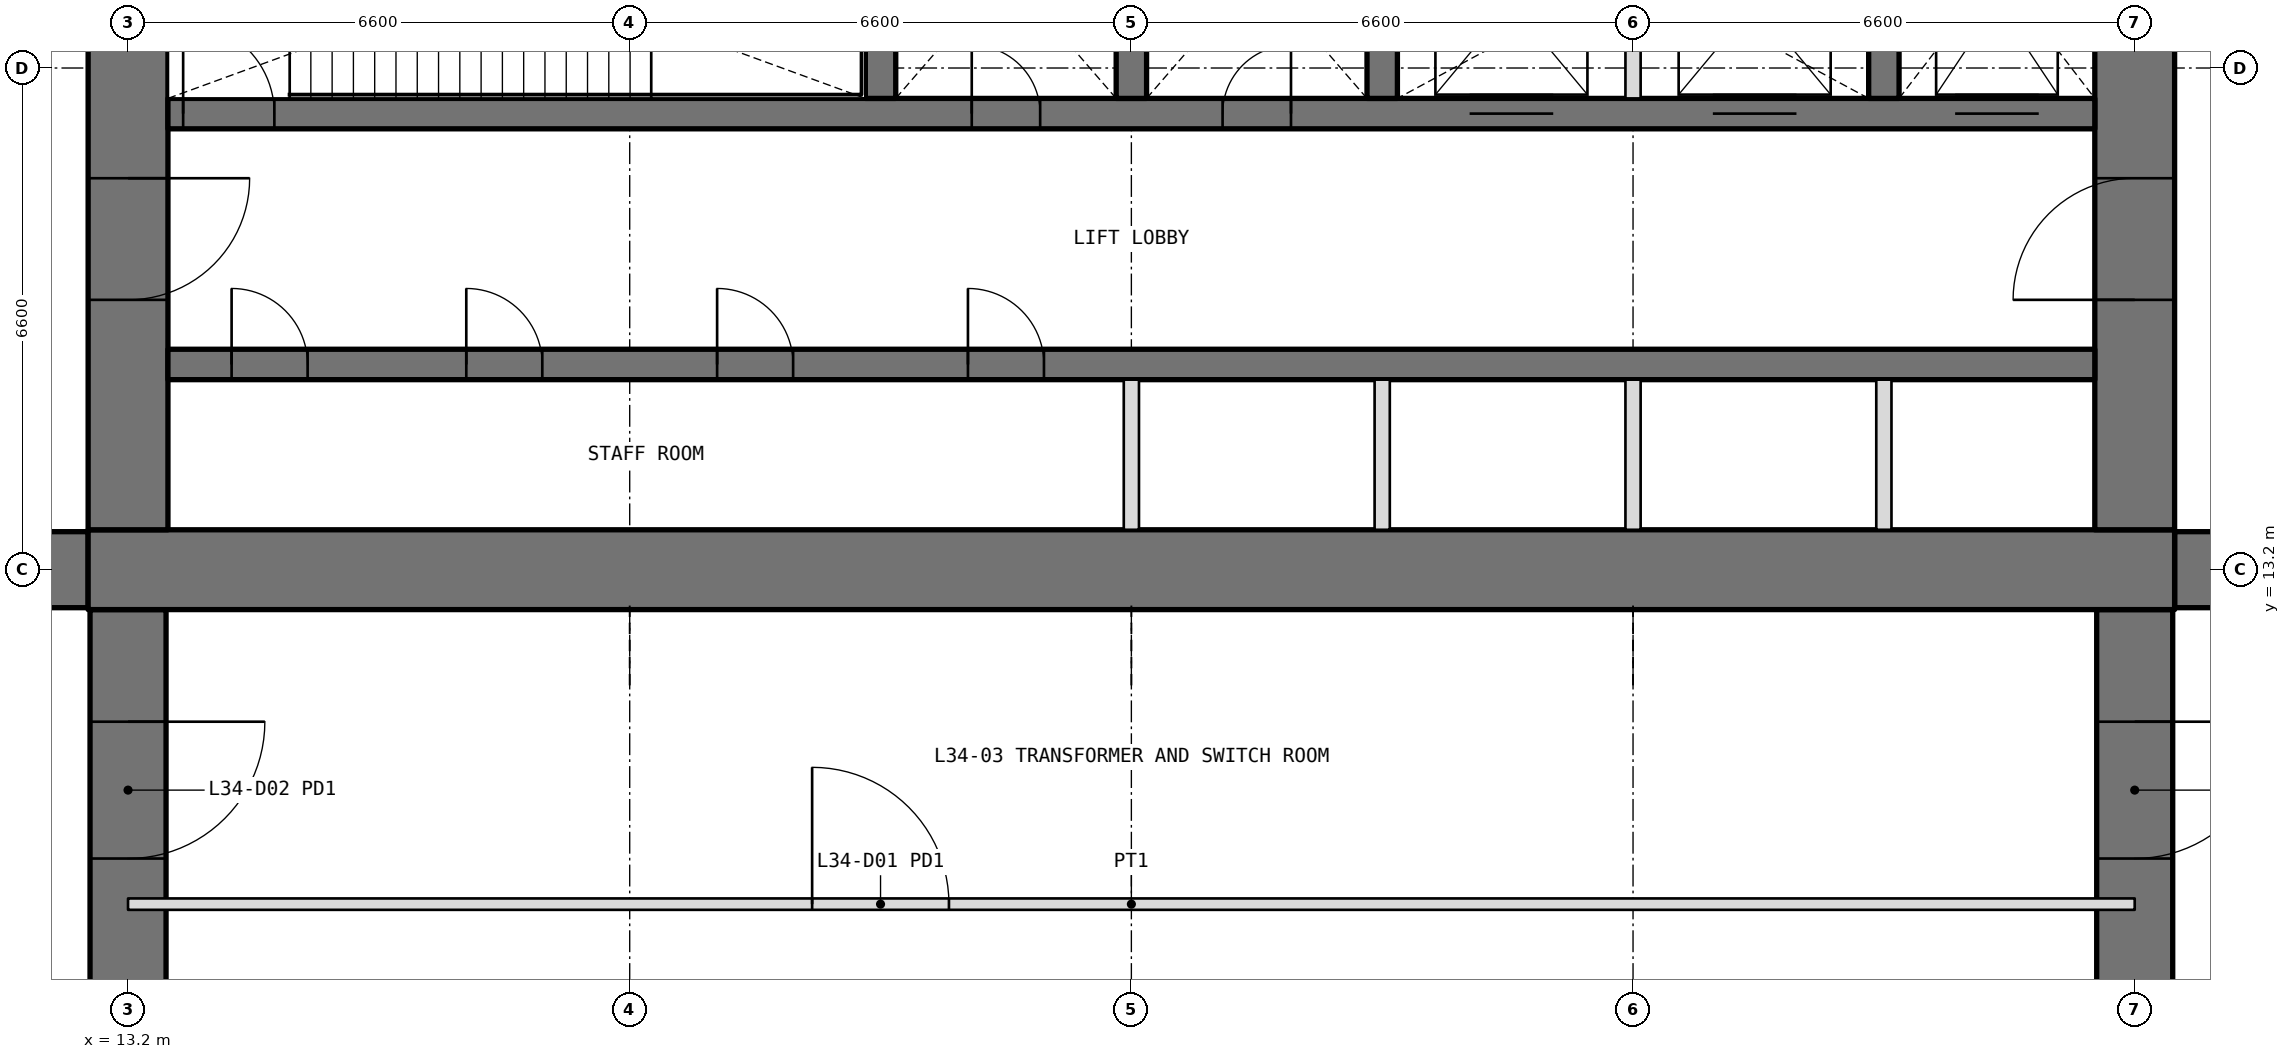
"""IFC4 building model, lengths in metres.
Left out: names, types, materials, properties, quantities, classifications, styles, units other than length and angle.
Written with IfcOpenShell. Run it as: python <this file> out.ifc"""

import sys

from ifc_helpers import new_model, si_unit, direction, frame, frame_2d, origin, place, context, subcontext, project, spatial, rectangle, extrude, element, fill, save


model = new_model("IFC4")
c1 = context("Model", 3, precision=1e-05, world=origin(), true_north=direction((0.0, 1.0)))
c2 = subcontext(c1, "Body", "Model", "MODEL_VIEW")
j1 = project(units=[si_unit("LENGTHUNIT", "METRE"), si_unit("PLANEANGLEUNIT", "RADIAN")], contexts=[c1])
p1 = place(None, origin())
s1 = spatial("IfcSite", under=j1, at=p1, CompositionType="ELEMENT")
p2 = place(p1, origin())
s2 = spatial("IfcBuilding", under=s1, at=p2, CompositionType="ELEMENT")
p3 = place(p2, frame((0.0, 0.0, 149.4)))
s3 = spatial("IfcBuildingStorey", under=s2, at=p3, CompositionType="ELEMENT", Elevation=149.4)
p4 = place(p3, frame((13.2, 12.675, 0.0), z_axis=(0.0, 0.0, 1.0), x_axis=(0.0, -1.0, 0.0)))
e1 = element("IfcWall", 1, at=p4, inside=s3, PredefinedType="SHEAR", context=c2, shape_type="SweptSolid", body=[
    extrude(rectangle(XDim=8.675, YDim=1.0, at=frame_2d((4.337, 0.0))), origin(), (0.0, 0.0, 1.0), 6.0),
])
p5 = place(p4, frame((1.475, 0.0, 0.0)))
e2 = element("IfcOpeningElement", 2, at=p5, cuts=e1, PredefinedType="OPENING", context=c2, shape_type="SweptSolid", body=[
    extrude(rectangle(XDim=1.8, YDim=2.4, at=frame_2d((0.9, 1.2))), frame((0.0, 0.51, 0.0), z_axis=(0.0, -1.0, 0.0), x_axis=(1.0, 0.0, 0.0)), (0.0, 0.0, 1.0), 1.02),
])
p6 = place(p3, frame((39.6, 12.675, 0.0), z_axis=(0.0, 0.0, 1.0), x_axis=(0.0, -1.0, 0.0)))
e3 = element("IfcWall", 3, at=p6, inside=s3, PredefinedType="SHEAR", context=c2, shape_type="SweptSolid", body=[
    extrude(rectangle(XDim=8.675, YDim=1.0, at=frame_2d((4.337, 0.0))), origin(), (0.0, 0.0, 1.0), 6.0),
])
p7 = place(p6, frame((1.475, 0.0, 0.0)))
e4 = element("IfcOpeningElement", 4, at=p7, cuts=e3, PredefinedType="OPENING", context=c2, shape_type="SweptSolid", body=[
    extrude(rectangle(XDim=1.8, YDim=2.4, at=frame_2d((0.9, 1.2))), frame((0.0, 0.51, 0.0), z_axis=(0.0, -1.0, 0.0), x_axis=(1.0, 0.0, 0.0)), (0.0, 0.0, 1.0), 1.02),
])
p8 = place(p3, frame((12.675, 13.2, 0.0), z_axis=(0.0, 0.0, 1.0), x_axis=(-1.0, 0.0, 0.0)))
e5 = element("IfcWall", 5, at=p8, inside=s3, PredefinedType="SHEAR", context=c2, shape_type="SweptSolid", body=[
    extrude(rectangle(XDim=5.375, YDim=1.0, at=frame_2d((2.688, 0.0))), origin(), (0.0, 0.0, 1.0), 6.0),
])
p9 = place(p8, frame((1.475, 0.0, 0.0)))
e6 = element("IfcOpeningElement", 6, at=p9, cuts=e5, PredefinedType="OPENING", context=c2, shape_type="SweptSolid", body=[
    extrude(rectangle(XDim=1.8, YDim=2.4, at=frame_2d((0.9, 1.2))), frame((0.0, 0.51, 0.0), z_axis=(0.0, -1.0, 0.0), x_axis=(1.0, 0.0, 0.0)), (0.0, 0.0, 1.0), 1.02),
])
p10 = place(p3, frame((40.125, 13.2, 0.0), z_axis=(0.0, 0.0, 1.0), x_axis=(1.0, 0.0, 0.0)))
e7 = element("IfcWall", 7, at=p10, inside=s3, PredefinedType="SHEAR", context=c2, shape_type="SweptSolid", body=[
    extrude(rectangle(XDim=5.375, YDim=1.0, at=frame_2d((2.688, 0.0))), origin(), (0.0, 0.0, 1.0), 6.0),
])
p11 = place(p10, frame((1.475, 0.0, 0.0)))
e8 = element("IfcOpeningElement", 8, at=p11, cuts=e7, PredefinedType="OPENING", context=c2, shape_type="SweptSolid", body=[
    extrude(rectangle(XDim=1.8, YDim=2.4, at=frame_2d((0.9, 1.2))), frame((0.0, 0.51, 0.0), z_axis=(0.0, -1.0, 0.0), x_axis=(1.0, 0.0, 0.0)), (0.0, 0.0, 1.0), 1.02),
])
p12 = place(p3, frame((12.675, 13.2, 0.0), z_axis=(0.0, 0.0, 1.0), x_axis=(1.0, 0.0, 0.0)))
e9 = element("IfcWall", 9, at=p12, inside=s3, PredefinedType="SHEAR", context=c2, shape_type="SweptSolid", body=[
    extrude(rectangle(XDim=27.45, YDim=1.05, at=frame_2d((13.725, 0.0))), origin(), (0.0, 0.0, 1.0), 6.3),
])
p13 = place(p3, frame((39.6, 13.725, 0.0), z_axis=(0.0, 0.0, 1.0), x_axis=(0.0, 1.0, 0.0)))
e10 = element("IfcWall", 10, at=p13, inside=s3, PredefinedType="SHEAR", context=c2, shape_type="SweptSolid", body=[
    extrude(rectangle(XDim=18.75, YDim=1.05, at=frame_2d((9.375, 0.0))), origin(), (0.0, 0.0, 1.0), 6.3),
])
p14 = place(p13, frame((3.025, 0.0, 0.0)))
e11 = element("IfcOpeningElement", 11, at=p14, cuts=e10, PredefinedType="OPENING", context=c2, shape_type="SweptSolid", body=[
    extrude(rectangle(XDim=1.6, YDim=2.1, at=frame_2d((0.8, 1.05))), frame((0.0, 0.535, 0.0), z_axis=(0.0, -1.0, 0.0), x_axis=(1.0, 0.0, 0.0)), (0.0, 0.0, 1.0), 1.07),
])
p15 = place(p13, frame((13.825, 0.0, 0.0)))
e12 = element("IfcOpeningElement", 12, at=p15, cuts=e10, PredefinedType="OPENING", context=c2, shape_type="SweptSolid", body=[
    extrude(rectangle(XDim=1.6, YDim=2.1, at=frame_2d((0.8, 1.05))), frame((0.0, 0.535, 0.0), z_axis=(0.0, -1.0, 0.0), x_axis=(1.0, 0.0, 0.0)), (0.0, 0.0, 1.0), 1.07),
])
p16 = place(p3, frame((13.2, 32.475, 0.0), z_axis=(0.0, 0.0, 1.0), x_axis=(0.0, -1.0, 0.0)))
e13 = element("IfcWall", 13, at=p16, inside=s3, PredefinedType="SHEAR", context=c2, shape_type="SweptSolid", body=[
    extrude(rectangle(XDim=18.75, YDim=1.05, at=frame_2d((9.375, 0.0))), origin(), (0.0, 0.0, 1.0), 6.3),
])
p17 = place(p16, frame((14.125, 0.0, 0.0)))
e14 = element("IfcOpeningElement", 14, at=p17, cuts=e13, PredefinedType="OPENING", context=c2, shape_type="SweptSolid", body=[
    extrude(rectangle(XDim=1.6, YDim=2.1, at=frame_2d((0.8, 1.05))), frame((0.0, 0.535, 0.0), z_axis=(0.0, -1.0, 0.0), x_axis=(1.0, 0.0, 0.0)), (0.0, 0.0, 1.0), 1.07),
])
p18 = place(p16, frame((3.325, 0.0, 0.0)))
e15 = element("IfcOpeningElement", 15, at=p18, cuts=e13, PredefinedType="OPENING", context=c2, shape_type="SweptSolid", body=[
    extrude(rectangle(XDim=1.6, YDim=2.1, at=frame_2d((0.8, 1.05))), frame((0.0, 0.535, 0.0), z_axis=(0.0, -1.0, 0.0), x_axis=(1.0, 0.0, 0.0)), (0.0, 0.0, 1.0), 1.07),
])
p19 = place(p3, frame((13.725, 15.9, 0.0), z_axis=(0.0, 0.0, 1.0), x_axis=(1.0, 0.0, 0.0)))
e16 = element("IfcWall", 16, at=p19, inside=s3, PredefinedType="SHEAR", context=c2, shape_type="SweptSolid", body=[
    extrude(rectangle(XDim=25.35, YDim=0.4, at=frame_2d((12.675, 0.0))), origin(), (0.0, 0.0, 1.0), 6.3),
])
p20 = place(p19, frame((0.837, 0.0, 0.0)))
e17 = element("IfcOpeningElement", 17, at=p20, cuts=e16, PredefinedType="OPENING", context=c2, shape_type="SweptSolid", body=[
    extrude(rectangle(XDim=1.0, YDim=2.1, at=frame_2d((0.5, 1.05))), frame((0.0, 0.21, 0.0), z_axis=(0.0, -1.0, 0.0), x_axis=(1.0, 0.0, 0.0)), (0.0, 0.0, 1.0), 0.42),
])
p21 = place(p19, frame((3.925, 0.0, 0.0)))
e18 = element("IfcOpeningElement", 18, at=p21, cuts=e16, PredefinedType="OPENING", context=c2, shape_type="SweptSolid", body=[
    extrude(rectangle(XDim=1.0, YDim=2.1, at=frame_2d((0.5, 1.05))), frame((0.0, 0.21, 0.0), z_axis=(0.0, -1.0, 0.0), x_axis=(1.0, 0.0, 0.0)), (0.0, 0.0, 1.0), 0.42),
])
p22 = place(p19, frame((7.225, 0.0, 0.0)))
e19 = element("IfcOpeningElement", 19, at=p22, cuts=e16, PredefinedType="OPENING", context=c2, shape_type="SweptSolid", body=[
    extrude(rectangle(XDim=1.0, YDim=2.1, at=frame_2d((0.5, 1.05))), frame((0.0, 0.21, 0.0), z_axis=(0.0, -1.0, 0.0), x_axis=(1.0, 0.0, 0.0)), (0.0, 0.0, 1.0), 0.42),
])
p23 = place(p19, frame((10.525, 0.0, 0.0)))
e20 = element("IfcOpeningElement", 20, at=p23, cuts=e16, PredefinedType="OPENING", context=c2, shape_type="SweptSolid", body=[
    extrude(rectangle(XDim=1.0, YDim=2.1, at=frame_2d((0.5, 1.05))), frame((0.0, 0.21, 0.0), z_axis=(0.0, -1.0, 0.0), x_axis=(1.0, 0.0, 0.0)), (0.0, 0.0, 1.0), 0.42),
])
p24 = place(p3, frame((13.725, 19.2, 0.0), z_axis=(0.0, 0.0, 1.0), x_axis=(1.0, 0.0, 0.0)))
e21 = element("IfcWall", 21, at=p24, inside=s3, PredefinedType="SHEAR", context=c2, shape_type="SweptSolid", body=[
    extrude(rectangle(XDim=25.35, YDim=0.4, at=frame_2d((12.675, 0.0))), origin(), (0.0, 0.0, 1.0), 6.3),
])
p25 = place(p24, frame((10.575, 0.0, 0.0)))
e22 = element("IfcOpeningElement", 22, at=p25, cuts=e21, PredefinedType="OPENING", context=c2, shape_type="SweptSolid", body=[
    extrude(rectangle(XDim=0.9, YDim=2.1, at=frame_2d((0.45, 1.05))), frame((0.0, 0.21, 0.0), z_axis=(0.0, -1.0, 0.0), x_axis=(1.0, 0.0, 0.0)), (0.0, 0.0, 1.0), 0.42),
])
p26 = place(p24, frame((13.875, 0.0, 0.0)))
e23 = element("IfcOpeningElement", 23, at=p26, cuts=e21, PredefinedType="OPENING", context=c2, shape_type="SweptSolid", body=[
    extrude(rectangle(XDim=0.9, YDim=2.1, at=frame_2d((0.45, 1.05))), frame((0.0, 0.21, 0.0), z_axis=(0.0, -1.0, 0.0), x_axis=(1.0, 0.0, 0.0)), (0.0, 0.0, 1.0), 0.42),
])
p27 = place(p24, frame((0.2, 0.0, 0.0)))
e24 = element("IfcOpeningElement", 24, at=p27, cuts=e21, PredefinedType="OPENING", context=c2, shape_type="SweptSolid", body=[
    extrude(rectangle(XDim=1.2, YDim=2.1, at=frame_2d((0.6, 1.05))), frame((0.0, 0.21, 0.0), z_axis=(0.0, -1.0, 0.0), x_axis=(1.0, 0.0, 0.0)), (0.0, 0.0, 1.0), 0.42),
])
p28 = place(p24, frame((23.512, 0.0, 0.0)))
e25 = element("IfcOpeningElement", 25, at=p28, cuts=e21, PredefinedType="OPENING", context=c2, shape_type="SweptSolid", body=[
    extrude(rectangle(XDim=1.1, YDim=2.1, at=frame_2d((0.55, 1.05))), frame((0.0, 0.21, 0.0), z_axis=(0.0, -1.0, 0.0), x_axis=(1.0, 0.0, 0.0)), (0.0, 0.0, 1.0), 0.42),
])
p29 = place(p24, frame((17.125, 0.0, 0.0)))
e26 = element("IfcOpeningElement", 26, at=p29, cuts=e21, PredefinedType="OPENING", context=c2, shape_type="SweptSolid", body=[
    extrude(rectangle(XDim=1.1, YDim=2.1, at=frame_2d((0.55, 1.05))), frame((0.0, 0.21, 0.0), z_axis=(0.0, -1.0, 0.0), x_axis=(1.0, 0.0, 0.0)), (0.0, 0.0, 1.0), 0.42),
])
p30 = place(p24, frame((20.325, 0.0, 0.0)))
e27 = element("IfcOpeningElement", 27, at=p30, cuts=e21, PredefinedType="OPENING", context=c2, shape_type="SweptSolid", body=[
    extrude(rectangle(XDim=1.1, YDim=2.1, at=frame_2d((0.55, 1.05))), frame((0.0, 0.21, 0.0), z_axis=(0.0, -1.0, 0.0), x_axis=(1.0, 0.0, 0.0)), (0.0, 0.0, 1.0), 0.42),
])
for number, where, z_axis, x_axis in (
    (28, (23.1, 19.4, 0.0), (0.0, 0.0, 1.0), (0.0, 1.0, 0.0)),
    (29, (26.4, 19.4, 0.0), (0.0, 0.0, 1.0), (0.0, 1.0, 0.0)),
    (30, (29.7, 19.4, 0.0), (0.0, 0.0, 1.0), (0.0, 1.0, 0.0)),
    (31, (36.3, 19.4, 0.0), (0.0, 0.0, 1.0), (0.0, 1.0, 0.0)),
):
    element("IfcWall", number, at=place(p3, frame(where, z_axis=z_axis, x_axis=x_axis)), inside=s3, PredefinedType="SHEAR", context=c2, shape_type="SweptSolid", body=[
        extrude(rectangle(XDim=3.35, YDim=0.4, at=frame_2d((1.675, 0.0))), origin(), (0.0, 0.0, 1.0), 6.3),
    ])
for number, where, z_axis, x_axis in (
    (32, (26.4, 13.725, 0.0), (0.0, 0.0, 1.0), (0.0, 1.0, 0.0)),
    (33, (29.7, 13.725, 0.0), (0.0, 0.0, 1.0), (0.0, 1.0, 0.0)),
    (34, (33.0, 13.725, 0.0), (0.0, 0.0, 1.0), (0.0, 1.0, 0.0)),
    (35, (36.3, 13.725, 0.0), (0.0, 0.0, 1.0), (0.0, 1.0, 0.0)),
):
    element("IfcWall", number, at=place(p3, frame(where, z_axis=z_axis, x_axis=x_axis)), inside=s3, PredefinedType="PARTITIONING", context=c2, shape_type="SweptSolid", body=[
        extrude(rectangle(XDim=1.975, YDim=0.2, at=frame_2d((0.987, 0.0))), origin(), (0.0, 0.0, 1.0), 6.3),
    ])
p31 = place(p3, frame((33.0, 19.4, 0.0), z_axis=(0.0, 0.0, 1.0), x_axis=(0.0, 1.0, 0.0)))
e36 = element("IfcWall", 36, at=p31, inside=s3, PredefinedType="PARTITIONING", context=c2, shape_type="SweptSolid", body=[
    extrude(rectangle(XDim=3.35, YDim=0.2, at=frame_2d((1.675, 0.0))), origin(), (0.0, 0.0, 1.0), 6.3),
])
p32 = place(p3, frame((13.2, 8.8, 0.0), z_axis=(0.0, 0.0, 1.0), x_axis=(1.0, 0.0, 0.0)))
e37 = element("IfcWall", 37, at=p32, inside=s3, PredefinedType="PARTITIONING", context=c2, shape_type="SweptSolid", body=[
    extrude(rectangle(XDim=26.4, YDim=0.15, at=frame_2d((13.2, 0.0))), origin(), (0.0, 0.0, 1.0), 4.0),
])
p33 = place(p32, frame((9.0, 0.0, 0.0)))
e38 = element("IfcOpeningElement", 38, at=p33, cuts=e37, PredefinedType="OPENING", context=c2, shape_type="SweptSolid", body=[
    extrude(rectangle(XDim=1.8, YDim=2.4, at=frame_2d((0.9, 1.2))), frame((0.0, 0.085, 0.0), z_axis=(0.0, -1.0, 0.0), x_axis=(1.0, 0.0, 0.0)), (0.0, 0.0, 1.0), 0.17),
])
p34 = place(p33, origin())
e39 = element("IfcDoor", 39, at=p34, inside=s3, OperationType="DOUBLE_DOOR_SINGLE_SWING", PredefinedType="DOOR", context=c2, shape_type="SweptSolid", body=[
    extrude(rectangle(XDim=1.8, YDim=2.4, at=frame_2d((0.9, 1.2))), frame((0.0, 0.025, 0.0), z_axis=(0.0, -1.0, 0.0), x_axis=(1.0, 0.0, 0.0)), (0.0, 0.0, 1.0), 0.05),
])
fill(e38, e39)
p35 = place(p5, origin())
e40 = element("IfcDoor", 40, at=p35, inside=s3, OperationType="DOUBLE_DOOR_SINGLE_SWING", PredefinedType="DOOR", context=c2, shape_type="SweptSolid", body=[
    extrude(rectangle(XDim=1.8, YDim=2.4, at=frame_2d((0.9, 1.2))), frame((0.0, 0.025, 0.0), z_axis=(0.0, -1.0, 0.0), x_axis=(1.0, 0.0, 0.0)), (0.0, 0.0, 1.0), 0.05),
])
fill(e2, e40)
p36 = place(p7, origin())
e41 = element("IfcDoor", 41, at=p36, inside=s3, OperationType="DOUBLE_DOOR_SINGLE_SWING", PredefinedType="DOOR", context=c2, shape_type="SweptSolid", body=[
    extrude(rectangle(XDim=1.8, YDim=2.4, at=frame_2d((0.9, 1.2))), frame((0.0, 0.025, 0.0), z_axis=(0.0, -1.0, 0.0), x_axis=(1.0, 0.0, 0.0)), (0.0, 0.0, 1.0), 0.05),
])
fill(e4, e41)
p37 = place(p25, origin())
e42 = element("IfcDoor", 42, at=p37, inside=s3, OperationType="SINGLE_SWING_LEFT", PredefinedType="DOOR", context=c2, shape_type="SweptSolid", body=[
    extrude(rectangle(XDim=0.9, YDim=2.1, at=frame_2d((0.45, 1.05))), frame((0.0, 0.025, 0.0), z_axis=(0.0, -1.0, 0.0), x_axis=(1.0, 0.0, 0.0)), (0.0, 0.0, 1.0), 0.05),
])
fill(e22, e42)
p38 = place(p26, origin())
e43 = element("IfcDoor", 43, at=p38, inside=s3, OperationType="SINGLE_SWING_RIGHT", PredefinedType="DOOR", context=c2, shape_type="SweptSolid", body=[
    extrude(rectangle(XDim=0.9, YDim=2.1, at=frame_2d((0.45, 1.05))), frame((0.0, 0.025, 0.0), z_axis=(0.0, -1.0, 0.0), x_axis=(1.0, 0.0, 0.0)), (0.0, 0.0, 1.0), 0.05),
])
fill(e23, e43)
p39 = place(p20, origin())
e44 = element("IfcDoor", 44, at=p39, inside=s3, OperationType="SINGLE_SWING_LEFT", PredefinedType="DOOR", context=c2, shape_type="SweptSolid", body=[
    extrude(rectangle(XDim=1.0, YDim=2.1, at=frame_2d((0.5, 1.05))), frame((0.0, 0.025, 0.0), z_axis=(0.0, -1.0, 0.0), x_axis=(1.0, 0.0, 0.0)), (0.0, 0.0, 1.0), 0.05),
])
fill(e17, e44)
p40 = place(p21, origin())
e45 = element("IfcDoor", 45, at=p40, inside=s3, OperationType="SINGLE_SWING_LEFT", PredefinedType="DOOR", context=c2, shape_type="SweptSolid", body=[
    extrude(rectangle(XDim=1.0, YDim=2.1, at=frame_2d((0.5, 1.05))), frame((0.0, 0.025, 0.0), z_axis=(0.0, -1.0, 0.0), x_axis=(1.0, 0.0, 0.0)), (0.0, 0.0, 1.0), 0.05),
])
fill(e18, e45)
p41 = place(p22, origin())
e46 = element("IfcDoor", 46, at=p41, inside=s3, OperationType="SINGLE_SWING_LEFT", PredefinedType="DOOR", context=c2, shape_type="SweptSolid", body=[
    extrude(rectangle(XDim=1.0, YDim=2.1, at=frame_2d((0.5, 1.05))), frame((0.0, 0.025, 0.0), z_axis=(0.0, -1.0, 0.0), x_axis=(1.0, 0.0, 0.0)), (0.0, 0.0, 1.0), 0.05),
])
fill(e19, e46)
p42 = place(p23, origin())
e47 = element("IfcDoor", 47, at=p42, inside=s3, OperationType="SINGLE_SWING_LEFT", PredefinedType="DOOR", context=c2, shape_type="SweptSolid", body=[
    extrude(rectangle(XDim=1.0, YDim=2.1, at=frame_2d((0.5, 1.05))), frame((0.0, 0.025, 0.0), z_axis=(0.0, -1.0, 0.0), x_axis=(1.0, 0.0, 0.0)), (0.0, 0.0, 1.0), 0.05),
])
fill(e20, e47)
p43 = place(p27, origin())
e48 = element("IfcDoor", 48, at=p43, inside=s3, OperationType="SINGLE_SWING_LEFT", PredefinedType="DOOR", context=c2, shape_type="SweptSolid", body=[
    extrude(rectangle(XDim=1.2, YDim=2.1, at=frame_2d((0.6, 1.05))), frame((0.0, 0.025, 0.0), z_axis=(0.0, -1.0, 0.0), x_axis=(1.0, 0.0, 0.0)), (0.0, 0.0, 1.0), 0.05),
])
fill(e24, e48)
p44 = place(p17, origin())
e49 = element("IfcDoor", 49, at=p44, inside=s3, OperationType="DOUBLE_DOOR_DOUBLE_SWING", PredefinedType="DOOR", context=c2, shape_type="SweptSolid", body=[
    extrude(rectangle(XDim=1.6, YDim=2.1, at=frame_2d((0.8, 1.05))), frame((0.0, 0.025, 0.0), z_axis=(0.0, -1.0, 0.0), x_axis=(1.0, 0.0, 0.0)), (0.0, 0.0, 1.0), 0.05),
])
fill(e14, e49)
p45 = place(p14, origin())
e50 = element("IfcDoor", 50, at=p45, inside=s3, OperationType="DOUBLE_DOOR_DOUBLE_SWING", PredefinedType="DOOR", context=c2, shape_type="SweptSolid", body=[
    extrude(rectangle(XDim=1.6, YDim=2.1, at=frame_2d((0.8, 1.05))), frame((0.0, 0.025, 0.0), z_axis=(0.0, -1.0, 0.0), x_axis=(1.0, 0.0, 0.0)), (0.0, 0.0, 1.0), 0.05),
])
fill(e11, e50)
p46 = place(p28, origin())
e51 = element("IfcDoor", 51, at=p46, inside=s3, OperationType="DOUBLE_DOOR_SLIDING", PredefinedType="DOOR", context=c2, shape_type="SweptSolid", body=[
    extrude(rectangle(XDim=1.1, YDim=2.1, at=frame_2d((0.55, 1.05))), frame((0.0, 0.025, 0.0), z_axis=(0.0, -1.0, 0.0), x_axis=(1.0, 0.0, 0.0)), (0.0, 0.0, 1.0), 0.05),
])
fill(e25, e51)
p47 = place(p29, origin())
e52 = element("IfcDoor", 52, at=p47, inside=s3, OperationType="DOUBLE_DOOR_SLIDING", PredefinedType="DOOR", context=c2, shape_type="SweptSolid", body=[
    extrude(rectangle(XDim=1.1, YDim=2.1, at=frame_2d((0.55, 1.05))), frame((0.0, 0.025, 0.0), z_axis=(0.0, -1.0, 0.0), x_axis=(1.0, 0.0, 0.0)), (0.0, 0.0, 1.0), 0.05),
])
fill(e26, e52)
p48 = place(p30, origin())
e53 = element("IfcDoor", 53, at=p48, inside=s3, OperationType="DOUBLE_DOOR_SLIDING", PredefinedType="DOOR", context=c2, shape_type="SweptSolid", body=[
    extrude(rectangle(XDim=1.1, YDim=2.1, at=frame_2d((0.55, 1.05))), frame((0.0, 0.025, 0.0), z_axis=(0.0, -1.0, 0.0), x_axis=(1.0, 0.0, 0.0)), (0.0, 0.0, 1.0), 0.05),
])
fill(e27, e53)
save(model, sys.argv[1])
